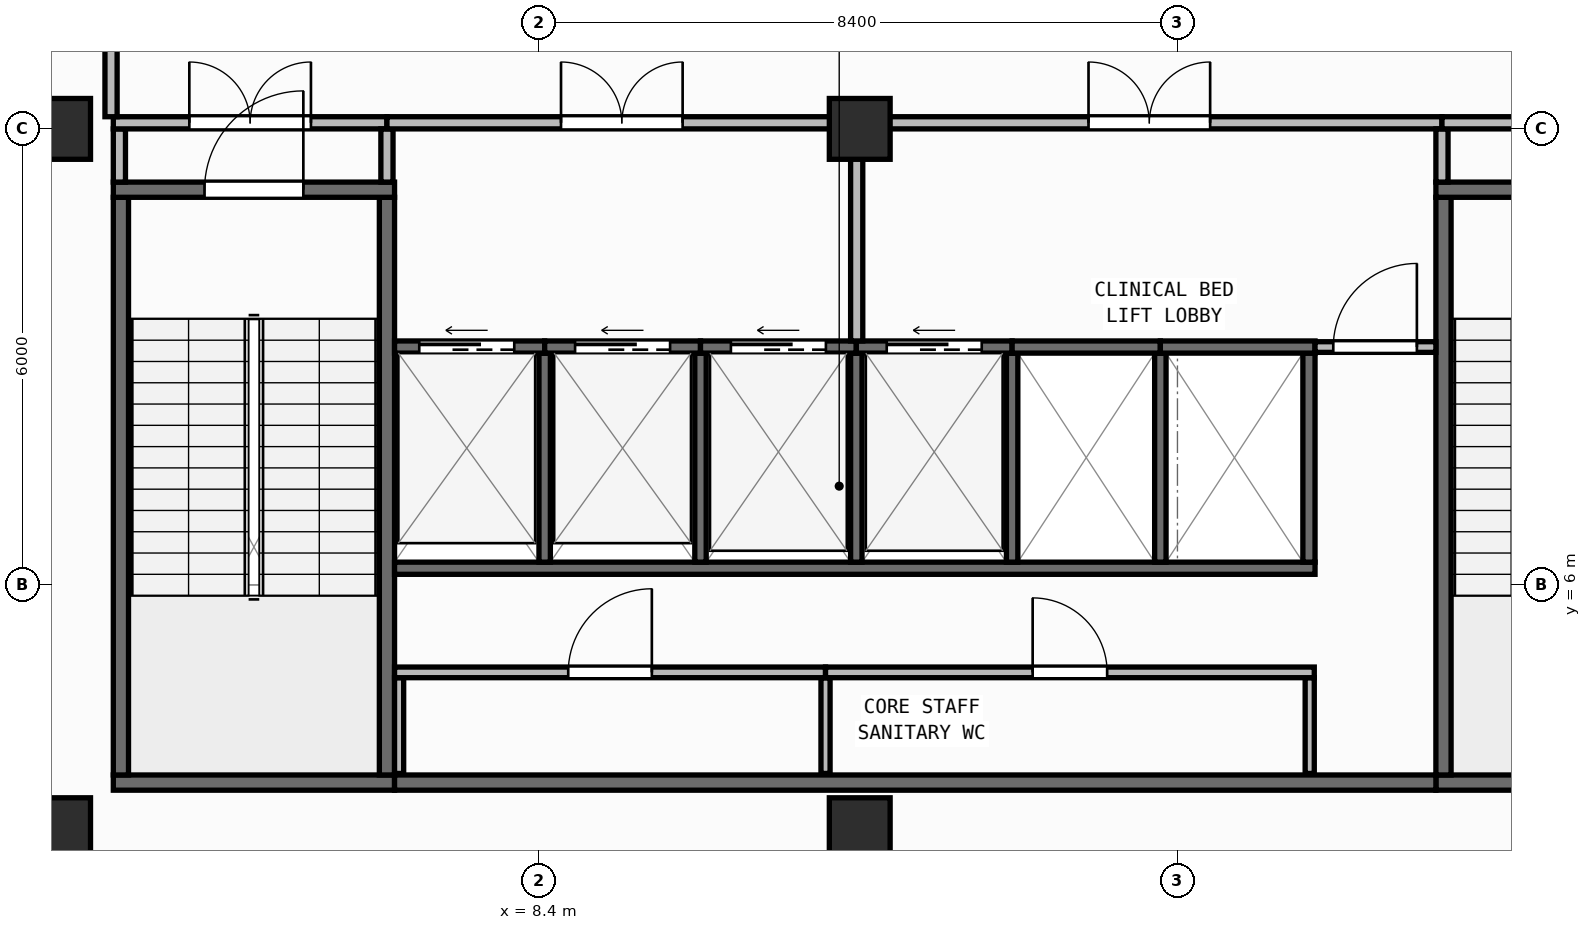
"""IFC4 building model, lengths in metres.
Left out: names, types, materials, properties, quantities, classifications, styles, units other than length and angle.
Written with IfcOpenShell. Run it as: python <this file> out.ifc"""

import sys

from ifc_helpers import new_model, si_unit, direction, frame, frame_2d, origin, origin_2d, place, context, subcontext, project, spatial, rectangle, extrude, element, fill, save


model = new_model("IFC4")
c1 = context("Model", 3, precision=1e-05, world=origin(), true_north=direction((0.0, 1.0)))
c2 = subcontext(c1, "Body", "Model", "MODEL_VIEW")
j1 = project(units=[si_unit("LENGTHUNIT", "METRE"), si_unit("PLANEANGLEUNIT", "RADIAN")], contexts=[c1])
p1 = place(None, origin())
s1 = spatial("IfcSite", under=j1, at=p1, CompositionType="ELEMENT")
p2 = place(p1, origin())
s2 = spatial("IfcBuilding", under=s1, at=p2, CompositionType="ELEMENT")
p3 = place(p2, frame((0.0, 0.0, 303.95)))
s3 = spatial("IfcBuildingStorey", under=s2, at=p3, CompositionType="ELEMENT", Elevation=303.95)
for number, where, z_axis, x_axis in (
    (1, (2.1, 2.8, 0.0), (0.0, 0.0, 1.0), (1.0, 0.0, 0.0)),
    (2, (12.62, 2.8, 0.0), (0.0, 0.0, 1.0), (1.0, 0.0, 0.0)),
    (3, (2.1, 12.0, 0.0), (0.0, 0.0, 1.0), (1.0, 0.0, 0.0)),
    (4, (12.62, 12.0, 0.0), (0.0, 0.0, 1.0), (1.0, 0.0, 0.0)),
):
    element("IfcColumn", number, at=place(p3, frame(where, z_axis=z_axis, x_axis=x_axis)), inside=s3, PredefinedType="COLUMN", context=c2, shape_type="SweptSolid", body=[
        extrude(rectangle(XDim=0.8, YDim=0.8, at=origin_2d()), origin(), (0.0, 0.0, 1.0), 5.25),
    ])
p4 = place(p3, frame((2.46, 0.171, 0.0), z_axis=(0.0, 0.0, 1.0), x_axis=(0.997760665813, 0.066885377746, 0.0)))
e5 = element("IfcWall", 5, at=p4, inside=s3, PredefinedType="STANDARD", context=c2, shape_type="SweptSolid", body=[
    extrude(rectangle(XDim=35.56, YDim=0.26, at=frame_2d((17.78, 0.0))), origin(), (0.0, 0.0, 1.0), 4.99),
])
p5 = place(p3, frame((2.8, 3.4, 0.0), z_axis=(0.0, 0.0, 1.0), x_axis=(1.0, 0.0, 0.0)))
e6 = element("IfcWall", 6, at=p5, inside=s3, PredefinedType="SHEAR", context=c2, shape_type="SweptSolid", body=[
    extrude(rectangle(XDim=3.7, YDim=0.2, at=frame_2d((1.85, 0.0))), origin(), (0.0, 0.0, 1.0), 4.99),
])
for number, where, z_axis, x_axis in (
    (7, (2.9, 3.5, 0.0), (0.0, 0.0, 1.0), (0.0, 1.0, 0.0)),
    (8, (6.4, 3.5, 0.0), (0.0, 0.0, 1.0), (0.0, 1.0, 0.0)),
):
    element("IfcWall", number, at=place(p3, frame(where, z_axis=z_axis, x_axis=x_axis)), inside=s3, PredefinedType="SHEAR", context=c2, shape_type="SweptSolid", body=[
        extrude(rectangle(XDim=7.6, YDim=0.2, at=frame_2d((3.8, 0.0))), origin(), (0.0, 0.0, 1.0), 4.99),
    ])
p6 = place(p3, frame((2.8, 11.2, 0.0), z_axis=(0.0, 0.0, 1.0), x_axis=(1.0, 0.0, 0.0)))
e9 = element("IfcWall", 9, at=p6, inside=s3, PredefinedType="SHEAR", context=c2, shape_type="SweptSolid", body=[
    extrude(rectangle(XDim=3.7, YDim=0.2, at=frame_2d((1.85, 0.0))), origin(), (0.0, 0.0, 1.0), 4.99),
])
p7 = place(p6, frame((1.2, 0.0, 0.0)))
e10 = element("IfcOpeningElement", 10, at=p7, cuts=e9, PredefinedType="OPENING", context=c2, shape_type="SweptSolid", body=[
    extrude(rectangle(XDim=1.3, YDim=2.15, at=frame_2d((0.65, 1.075))), frame((0.0, 0.11, 0.0), z_axis=(0.0, -1.0, 0.0), x_axis=(1.0, 0.0, 0.0)), (0.0, 0.0, 1.0), 0.22),
])
p8 = place(p3, frame((20.2, 3.4, 0.0), z_axis=(0.0, 0.0, 1.0), x_axis=(1.0, 0.0, 0.0)))
e11 = element("IfcWall", 11, at=p8, inside=s3, PredefinedType="SHEAR", context=c2, shape_type="SweptSolid", body=[
    extrude(rectangle(XDim=3.7, YDim=0.2, at=frame_2d((1.85, 0.0))), origin(), (0.0, 0.0, 1.0), 4.99),
])
p9 = place(p3, frame((20.3, 3.5, 0.0), z_axis=(0.0, 0.0, 1.0), x_axis=(0.0, 1.0, 0.0)))
e12 = element("IfcWall", 12, at=p9, inside=s3, PredefinedType="SHEAR", context=c2, shape_type="SweptSolid", body=[
    extrude(rectangle(XDim=7.6, YDim=0.2, at=frame_2d((3.8, 0.0))), origin(), (0.0, 0.0, 1.0), 4.99),
])
p10 = place(p3, frame((20.2, 11.2, 0.0), z_axis=(0.0, 0.0, 1.0), x_axis=(1.0, 0.0, 0.0)))
e13 = element("IfcWall", 13, at=p10, inside=s3, PredefinedType="SHEAR", context=c2, shape_type="SweptSolid", body=[
    extrude(rectangle(XDim=3.7, YDim=0.2, at=frame_2d((1.85, 0.0))), origin(), (0.0, 0.0, 1.0), 4.99),
])
p11 = place(p10, frame((1.2, 0.0, 0.0)))
e14 = element("IfcOpeningElement", 14, at=p11, cuts=e13, PredefinedType="OPENING", context=c2, shape_type="SweptSolid", body=[
    extrude(rectangle(XDim=1.3, YDim=2.15, at=frame_2d((0.65, 1.075))), frame((0.0, 0.11, 0.0), z_axis=(0.0, -1.0, 0.0), x_axis=(1.0, 0.0, 0.0)), (0.0, 0.0, 1.0), 0.22),
])
p12 = place(p3, frame((6.5, 3.4, 0.0), z_axis=(0.0, 0.0, 1.0), x_axis=(1.0, 0.0, 0.0)))
e15 = element("IfcWall", 15, at=p12, inside=s3, PredefinedType="SHEAR", context=c2, shape_type="SweptSolid", body=[
    extrude(rectangle(XDim=13.7, YDim=0.2, at=frame_2d((6.85, 0.0))), origin(), (0.0, 0.0, 1.0), 4.99),
])
p13 = place(p3, frame((6.5, 6.22, 0.0), z_axis=(0.0, 0.0, 1.0), x_axis=(1.0, 0.0, 0.0)))
e16 = element("IfcWall", 16, at=p13, inside=s3, PredefinedType="SHEAR", context=c2, shape_type="SweptSolid", body=[
    extrude(rectangle(XDim=12.11, YDim=0.16, at=frame_2d((6.055, 0.0))), origin(), (0.0, 0.0, 1.0), 4.99),
])
p14 = place(p3, frame((18.53, 6.3, 0.0), z_axis=(0.0, 0.0, 1.0), x_axis=(0.0, 1.0, 0.0)))
e17 = element("IfcWall", 17, at=p14, inside=s3, PredefinedType="SHEAR", context=c2, shape_type="SweptSolid", body=[
    extrude(rectangle(XDim=2.75, YDim=0.16, at=frame_2d((1.375, 0.0))), origin(), (0.0, 0.0, 1.0), 4.99),
])
for number, where, z_axis, x_axis in (
    (18, (8.475, 6.3, 0.0), (0.0, 0.0, 1.0), (0.0, 1.0, 0.0)),
    (19, (10.525, 6.3, 0.0), (0.0, 0.0, 1.0), (0.0, 1.0, 0.0)),
    (20, (12.575, 6.3, 0.0), (0.0, 0.0, 1.0), (0.0, 1.0, 0.0)),
    (21, (14.625, 6.3, 0.0), (0.0, 0.0, 1.0), (0.0, 1.0, 0.0)),
    (22, (16.575, 6.3, 0.0), (0.0, 0.0, 1.0), (0.0, 1.0, 0.0)),
):
    element("IfcWall", number, at=place(p3, frame(where, z_axis=z_axis, x_axis=x_axis)), inside=s3, PredefinedType="SHEAR", context=c2, shape_type="SweptSolid", body=[
        extrude(rectangle(XDim=2.75, YDim=0.15, at=frame_2d((1.375, 0.0))), origin(), (0.0, 0.0, 1.0), 4.99),
    ])
p15 = place(p3, frame((6.5, 9.13, 0.0), z_axis=(0.0, 0.0, 1.0), x_axis=(1.0, 0.0, 0.0)))
e23 = element("IfcWall", 23, at=p15, inside=s3, PredefinedType="SHEAR", context=c2, shape_type="SweptSolid", body=[
    extrude(rectangle(XDim=1.975, YDim=0.16, at=frame_2d((0.988, 0.0))), origin(), (0.0, 0.0, 1.0), 4.99),
])
p16 = place(p15, frame((0.325, 0.0, 0.0)))
e24 = element("IfcOpeningElement", 24, at=p16, cuts=e23, PredefinedType="OPENING", context=c2, shape_type="SweptSolid", body=[
    extrude(rectangle(XDim=1.25, YDim=2.15, at=frame_2d((0.625, 1.075))), frame((0.0, 0.09, 0.0), z_axis=(0.0, -1.0, 0.0), x_axis=(1.0, 0.0, 0.0)), (0.0, 0.0, 1.0), 0.18),
])
p17 = place(p3, frame((8.475, 9.13, 0.0), z_axis=(0.0, 0.0, 1.0), x_axis=(1.0, 0.0, 0.0)))
e25 = element("IfcWall", 25, at=p17, inside=s3, PredefinedType="SHEAR", context=c2, shape_type="SweptSolid", body=[
    extrude(rectangle(XDim=2.05, YDim=0.16, at=frame_2d((1.025, 0.0))), origin(), (0.0, 0.0, 1.0), 4.99),
])
p18 = place(p17, frame((0.4, 0.0, 0.0)))
e26 = element("IfcOpeningElement", 26, at=p18, cuts=e25, PredefinedType="OPENING", context=c2, shape_type="SweptSolid", body=[
    extrude(rectangle(XDim=1.25, YDim=2.15, at=frame_2d((0.625, 1.075))), frame((0.0, 0.09, 0.0), z_axis=(0.0, -1.0, 0.0), x_axis=(1.0, 0.0, 0.0)), (0.0, 0.0, 1.0), 0.18),
])
p19 = place(p3, frame((10.525, 9.13, 0.0), z_axis=(0.0, 0.0, 1.0), x_axis=(1.0, 0.0, 0.0)))
e27 = element("IfcWall", 27, at=p19, inside=s3, PredefinedType="SHEAR", context=c2, shape_type="SweptSolid", body=[
    extrude(rectangle(XDim=2.05, YDim=0.16, at=frame_2d((1.025, 0.0))), origin(), (0.0, 0.0, 1.0), 4.99),
])
p20 = place(p19, frame((0.4, 0.0, 0.0)))
e28 = element("IfcOpeningElement", 28, at=p20, cuts=e27, PredefinedType="OPENING", context=c2, shape_type="SweptSolid", body=[
    extrude(rectangle(XDim=1.25, YDim=2.15, at=frame_2d((0.625, 1.075))), frame((0.0, 0.09, 0.0), z_axis=(0.0, -1.0, 0.0), x_axis=(1.0, 0.0, 0.0)), (0.0, 0.0, 1.0), 0.18),
])
p21 = place(p3, frame((12.575, 9.13, 0.0), z_axis=(0.0, 0.0, 1.0), x_axis=(1.0, 0.0, 0.0)))
e29 = element("IfcWall", 29, at=p21, inside=s3, PredefinedType="SHEAR", context=c2, shape_type="SweptSolid", body=[
    extrude(rectangle(XDim=2.05, YDim=0.16, at=frame_2d((1.025, 0.0))), origin(), (0.0, 0.0, 1.0), 4.99),
])
p22 = place(p21, frame((0.4, 0.0, 0.0)))
e30 = element("IfcOpeningElement", 30, at=p22, cuts=e29, PredefinedType="OPENING", context=c2, shape_type="SweptSolid", body=[
    extrude(rectangle(XDim=1.25, YDim=2.15, at=frame_2d((0.625, 1.075))), frame((0.0, 0.09, 0.0), z_axis=(0.0, -1.0, 0.0), x_axis=(1.0, 0.0, 0.0)), (0.0, 0.0, 1.0), 0.18),
])
p23 = place(p3, frame((14.625, 9.13, 0.0), z_axis=(0.0, 0.0, 1.0), x_axis=(1.0, 0.0, 0.0)))
e31 = element("IfcWall", 31, at=p23, inside=s3, PredefinedType="SHEAR", context=c2, shape_type="SweptSolid", body=[
    extrude(rectangle(XDim=1.95, YDim=0.16, at=frame_2d((0.975, 0.0))), origin(), (0.0, 0.0, 1.0), 4.99),
])
p24 = place(p3, frame((16.575, 9.13, 0.0), z_axis=(0.0, 0.0, 1.0), x_axis=(1.0, 0.0, 0.0)))
e32 = element("IfcWall", 32, at=p24, inside=s3, PredefinedType="SHEAR", context=c2, shape_type="SweptSolid", body=[
    extrude(rectangle(XDim=2.035, YDim=0.16, at=frame_2d((1.018, 0.0))), origin(), (0.0, 0.0, 1.0), 4.99),
])
p25 = place(p3, frame((6.56, 3.52, 0.0), z_axis=(0.0, 0.0, 1.0), x_axis=(0.0, 1.0, 0.0)))
e33 = element("IfcWall", 33, at=p25, inside=s3, PredefinedType="PARTITIONING", context=c2, shape_type="SweptSolid", body=[
    extrude(rectangle(XDim=1.26, YDim=0.12, at=frame_2d((0.63, 0.0))), origin(), (0.0, 0.0, 1.0), 4.99),
])
p26 = place(p3, frame((12.17, 3.52, 0.0), z_axis=(0.0, 0.0, 1.0), x_axis=(0.0, 1.0, 0.0)))
e34 = element("IfcWall", 34, at=p26, inside=s3, PredefinedType="PARTITIONING", context=c2, shape_type="SweptSolid", body=[
    extrude(rectangle(XDim=1.26, YDim=0.12, at=frame_2d((0.63, 0.0))), origin(), (0.0, 0.0, 1.0), 4.437),
])
p27 = place(p3, frame((18.54, 3.52, 0.0), z_axis=(0.0, 0.0, 1.0), x_axis=(0.0, 1.0, 0.0)))
e35 = element("IfcWall", 35, at=p27, inside=s3, PredefinedType="PARTITIONING", context=c2, shape_type="SweptSolid", body=[
    extrude(rectangle(XDim=1.26, YDim=0.12, at=frame_2d((0.63, 0.0))), origin(), (0.0, 0.0, 1.0), 4.99),
])
p28 = place(p3, frame((6.5, 4.85, 0.0), z_axis=(0.0, 0.0, 1.0), x_axis=(1.0, 0.0, 0.0)))
e36 = element("IfcWall", 36, at=p28, inside=s3, PredefinedType="PARTITIONING", context=c2, shape_type="SweptSolid", body=[
    extrude(rectangle(XDim=5.67, YDim=0.14, at=frame_2d((2.835, 0.0))), origin(), (0.0, 0.0, 1.0), 4.99),
])
p29 = place(p28, frame((2.285, 0.0, 0.0)))
e37 = element("IfcOpeningElement", 37, at=p29, cuts=e36, PredefinedType="OPENING", context=c2, shape_type="SweptSolid", body=[
    extrude(rectangle(XDim=1.1, YDim=2.1, at=frame_2d((0.55, 1.05))), frame((0.0, 0.08, 0.0), z_axis=(0.0, -1.0, 0.0), x_axis=(1.0, 0.0, 0.0)), (0.0, 0.0, 1.0), 0.16),
])
p30 = place(p3, frame((12.17, 4.85, 0.0), z_axis=(0.0, 0.0, 1.0), x_axis=(1.0, 0.0, 0.0)))
e38 = element("IfcWall", 38, at=p30, inside=s3, PredefinedType="PARTITIONING", context=c2, shape_type="SweptSolid", body=[
    extrude(rectangle(XDim=6.43, YDim=0.14, at=frame_2d((3.215, 0.0))), origin(), (0.0, 0.0, 1.0), 4.99),
])
p31 = place(p30, frame((2.725, 0.0, 0.0)))
e39 = element("IfcOpeningElement", 39, at=p31, cuts=e38, PredefinedType="OPENING", context=c2, shape_type="SweptSolid", body=[
    extrude(rectangle(XDim=0.98, YDim=2.1, at=frame_2d((0.49, 1.05))), frame((0.0, 0.08, 0.0), z_axis=(0.0, -1.0, 0.0), x_axis=(1.0, 0.0, 0.0)), (0.0, 0.0, 1.0), 0.16),
])
p32 = place(p3, frame((18.61, 9.13, 0.0), z_axis=(0.0, 0.0, 1.0), x_axis=(1.0, 0.0, 0.0)))
e40 = element("IfcWall", 40, at=p32, inside=s3, PredefinedType="PARTITIONING", context=c2, shape_type="SweptSolid", body=[
    extrude(rectangle(XDim=1.59, YDim=0.14, at=frame_2d((0.795, 0.0))), origin(), (0.0, 0.0, 1.0), 4.99),
])
p33 = place(p32, frame((0.24, 0.0, 0.0)))
e41 = element("IfcOpeningElement", 41, at=p33, cuts=e40, PredefinedType="OPENING", context=c2, shape_type="SweptSolid", body=[
    extrude(rectangle(XDim=1.1, YDim=2.1, at=frame_2d((0.55, 1.05))), frame((0.0, 0.08, 0.0), z_axis=(0.0, -1.0, 0.0), x_axis=(1.0, 0.0, 0.0)), (0.0, 0.0, 1.0), 0.16),
])
p34 = place(p3, frame((2.88, 11.3, 0.0), z_axis=(0.0, 0.0, 1.0), x_axis=(0.0, 1.0, 0.0)))
e42 = element("IfcWall", 42, at=p34, inside=s3, PredefinedType="PARTITIONING", context=c2, shape_type="SweptSolid", body=[
    extrude(rectangle(XDim=0.7, YDim=0.16, at=frame_2d((0.35, 0.0))), origin(), (0.0, 0.0, 1.0), 4.99),
])
p35 = place(p3, frame((2.8, 12.08, 0.0), z_axis=(0.0, 0.0, 1.0), x_axis=(1.0, 0.0, 0.0)))
e43 = element("IfcWall", 43, at=p35, inside=s3, PredefinedType="PARTITIONING", context=c2, shape_type="SweptSolid", body=[
    extrude(rectangle(XDim=3.6, YDim=0.16, at=frame_2d((1.8, 0.0))), origin(), (0.0, 0.0, 1.0), 4.265),
])
p36 = place(p35, frame((1.0, 0.0, 0.0)))
e44 = element("IfcOpeningElement", 44, at=p36, cuts=e43, PredefinedType="OPENING", context=c2, shape_type="SweptSolid", body=[
    extrude(rectangle(XDim=1.6, YDim=2.05, at=frame_2d((0.8, 1.025))), frame((0.0, 0.09, 0.0), z_axis=(0.0, -1.0, 0.0), x_axis=(1.0, 0.0, 0.0)), (0.0, 0.0, 1.0), 0.18),
])
p37 = place(p3, frame((6.4, 11.3, 0.0), z_axis=(0.0, 0.0, 1.0), x_axis=(0.0, 1.0, 0.0)))
e45 = element("IfcWall", 45, at=p37, inside=s3, PredefinedType="PARTITIONING", context=c2, shape_type="SweptSolid", body=[
    extrude(rectangle(XDim=0.7, YDim=0.16, at=frame_2d((0.35, 0.0))), origin(), (0.0, 0.0, 1.0), 4.99),
])
p38 = place(p3, frame((6.4, 12.08, 0.0), z_axis=(0.0, 0.0, 1.0), x_axis=(1.0, 0.0, 0.0)))
e46 = element("IfcWall", 46, at=p38, inside=s3, PredefinedType="PARTITIONING", context=c2, shape_type="SweptSolid", body=[
    extrude(rectangle(XDim=6.18, YDim=0.16, at=frame_2d((3.09, 0.0))), origin(), (0.0, 0.0, 1.0), 4.265),
])
p39 = place(p38, frame((2.29, 0.0, 0.0)))
e47 = element("IfcOpeningElement", 47, at=p39, cuts=e46, PredefinedType="OPENING", context=c2, shape_type="SweptSolid", body=[
    extrude(rectangle(XDim=1.6, YDim=2.05, at=frame_2d((0.8, 1.025))), frame((0.0, 0.09, 0.0), z_axis=(0.0, -1.0, 0.0), x_axis=(1.0, 0.0, 0.0)), (0.0, 0.0, 1.0), 0.18),
])
p40 = place(p3, frame((12.58, 9.21, 0.0), z_axis=(0.0, 0.0, 1.0), x_axis=(0.0, 1.0, 0.0)))
e48 = element("IfcWall", 48, at=p40, inside=s3, PredefinedType="PARTITIONING", context=c2, shape_type="SweptSolid", body=[
    extrude(rectangle(XDim=2.79, YDim=0.16, at=frame_2d((1.395, 0.0))), origin(), (0.0, 0.0, 1.0), 4.437),
])
p41 = place(p3, frame((12.58, 12.08, 0.0), z_axis=(0.0, 0.0, 1.0), x_axis=(1.0, 0.0, 0.0)))
e49 = element("IfcWall", 49, at=p41, inside=s3, PredefinedType="PARTITIONING", context=c2, shape_type="SweptSolid", body=[
    extrude(rectangle(XDim=7.7, YDim=0.16, at=frame_2d((3.85, 0.0))), origin(), (0.0, 0.0, 1.0), 4.265),
])
p42 = place(p41, frame((3.05, 0.0, 0.0)))
e50 = element("IfcOpeningElement", 50, at=p42, cuts=e49, PredefinedType="OPENING", context=c2, shape_type="SweptSolid", body=[
    extrude(rectangle(XDim=1.6, YDim=2.05, at=frame_2d((0.8, 1.025))), frame((0.0, 0.09, 0.0), z_axis=(0.0, -1.0, 0.0), x_axis=(1.0, 0.0, 0.0)), (0.0, 0.0, 1.0), 0.18),
])
p43 = place(p3, frame((20.28, 11.3, 0.0), z_axis=(0.0, 0.0, 1.0), x_axis=(0.0, 1.0, 0.0)))
e51 = element("IfcWall", 51, at=p43, inside=s3, PredefinedType="PARTITIONING", context=c2, shape_type="SweptSolid", body=[
    extrude(rectangle(XDim=0.7, YDim=0.16, at=frame_2d((0.35, 0.0))), origin(), (0.0, 0.0, 1.0), 4.99),
])
p44 = place(p3, frame((20.28, 12.08, 0.0), z_axis=(0.0, 0.0, 1.0), x_axis=(1.0, 0.0, 0.0)))
e52 = element("IfcWall", 52, at=p44, inside=s3, PredefinedType="PARTITIONING", context=c2, shape_type="SweptSolid", body=[
    extrude(rectangle(XDim=3.62, YDim=0.16, at=frame_2d((1.81, 0.0))), origin(), (0.0, 0.0, 1.0), 4.265),
])
p45 = place(p44, frame((1.01, 0.0, 0.0)))
e53 = element("IfcOpeningElement", 53, at=p45, cuts=e52, PredefinedType="OPENING", context=c2, shape_type="SweptSolid", body=[
    extrude(rectangle(XDim=1.6, YDim=2.05, at=frame_2d((0.8, 1.025))), frame((0.0, 0.09, 0.0), z_axis=(0.0, -1.0, 0.0), x_axis=(1.0, 0.0, 0.0)), (0.0, 0.0, 1.0), 0.18),
])
p46 = place(p3, frame((2.77, 12.16, 0.0), z_axis=(0.0, 0.0, 1.0), x_axis=(0.0, 1.0, 0.0)))
e54 = element("IfcWall", 54, at=p46, inside=s3, PredefinedType="PARTITIONING", context=c2, shape_type="SweptSolid", body=[
    extrude(rectangle(XDim=16.04, YDim=0.16, at=frame_2d((8.02, 0.0))), origin(), (0.0, 0.0, 1.0), 4.99),
])
p47 = place(p7, origin())
e55 = element("IfcDoor", 55, at=p47, inside=s3, OperationType="SINGLE_SWING_RIGHT", PredefinedType="DOOR", context=c2, shape_type="SweptSolid", body=[
    extrude(rectangle(XDim=1.3, YDim=2.15, at=frame_2d((0.65, 1.075))), frame((0.0, 0.025, 0.0), z_axis=(0.0, -1.0, 0.0), x_axis=(1.0, 0.0, 0.0)), (0.0, 0.0, 1.0), 0.05),
])
fill(e10, e55)
p48 = place(p16, origin())
e56 = element("IfcDoor", 56, at=p48, inside=s3, OperationType="SLIDING_TO_LEFT", PredefinedType="DOOR", context=c2, shape_type="SweptSolid", body=[
    extrude(rectangle(XDim=1.25, YDim=2.15, at=frame_2d((0.625, 1.075))), frame((0.0, 0.025, 0.0), z_axis=(0.0, -1.0, 0.0), x_axis=(1.0, 0.0, 0.0)), (0.0, 0.0, 1.0), 0.05),
])
fill(e24, e56)
p49 = place(p18, origin())
e57 = element("IfcDoor", 57, at=p49, inside=s3, OperationType="SLIDING_TO_LEFT", PredefinedType="DOOR", context=c2, shape_type="SweptSolid", body=[
    extrude(rectangle(XDim=1.25, YDim=2.15, at=frame_2d((0.625, 1.075))), frame((0.0, 0.025, 0.0), z_axis=(0.0, -1.0, 0.0), x_axis=(1.0, 0.0, 0.0)), (0.0, 0.0, 1.0), 0.05),
])
fill(e26, e57)
p50 = place(p20, origin())
e58 = element("IfcDoor", 58, at=p50, inside=s3, OperationType="SLIDING_TO_LEFT", PredefinedType="DOOR", context=c2, shape_type="SweptSolid", body=[
    extrude(rectangle(XDim=1.25, YDim=2.15, at=frame_2d((0.625, 1.075))), frame((0.0, 0.025, 0.0), z_axis=(0.0, -1.0, 0.0), x_axis=(1.0, 0.0, 0.0)), (0.0, 0.0, 1.0), 0.05),
])
fill(e28, e58)
p51 = place(p22, origin())
e59 = element("IfcDoor", 59, at=p51, inside=s3, OperationType="SLIDING_TO_LEFT", PredefinedType="DOOR", context=c2, shape_type="SweptSolid", body=[
    extrude(rectangle(XDim=1.25, YDim=2.15, at=frame_2d((0.625, 1.075))), frame((0.0, 0.025, 0.0), z_axis=(0.0, -1.0, 0.0), x_axis=(1.0, 0.0, 0.0)), (0.0, 0.0, 1.0), 0.05),
])
fill(e30, e59)
p52 = place(p29, origin())
e60 = element("IfcDoor", 60, at=p52, inside=s3, OperationType="SINGLE_SWING_RIGHT", PredefinedType="DOOR", context=c2, shape_type="SweptSolid", body=[
    extrude(rectangle(XDim=1.1, YDim=2.1, at=frame_2d((0.55, 1.05))), frame((0.0, 0.025, 0.0), z_axis=(0.0, -1.0, 0.0), x_axis=(1.0, 0.0, 0.0)), (0.0, 0.0, 1.0), 0.05),
])
fill(e37, e60)
p53 = place(p31, origin())
e61 = element("IfcDoor", 61, at=p53, inside=s3, OperationType="SINGLE_SWING_LEFT", PredefinedType="DOOR", context=c2, shape_type="SweptSolid", body=[
    extrude(rectangle(XDim=0.98, YDim=2.1, at=frame_2d((0.49, 1.05))), frame((0.0, 0.025, 0.0), z_axis=(0.0, -1.0, 0.0), x_axis=(1.0, 0.0, 0.0)), (0.0, 0.0, 1.0), 0.05),
])
fill(e39, e61)
p54 = place(p33, origin())
e62 = element("IfcDoor", 62, at=p54, inside=s3, OperationType="SINGLE_SWING_RIGHT", PredefinedType="DOOR", context=c2, shape_type="SweptSolid", body=[
    extrude(rectangle(XDim=1.1, YDim=2.1, at=frame_2d((0.55, 1.05))), frame((0.0, 0.025, 0.0), z_axis=(0.0, -1.0, 0.0), x_axis=(1.0, 0.0, 0.0)), (0.0, 0.0, 1.0), 0.05),
])
fill(e41, e62)
p55 = place(p36, origin())
e63 = element("IfcDoor", 63, at=p55, inside=s3, OperationType="DOUBLE_DOOR_SINGLE_SWING", PredefinedType="DOOR", context=c2, shape_type="SweptSolid", body=[
    extrude(rectangle(XDim=1.6, YDim=2.05, at=frame_2d((0.8, 1.025))), frame((0.0, 0.025, 0.0), z_axis=(0.0, -1.0, 0.0), x_axis=(1.0, 0.0, 0.0)), (0.0, 0.0, 1.0), 0.05),
])
fill(e44, e63)
p56 = place(p39, origin())
e64 = element("IfcDoor", 64, at=p56, inside=s3, OperationType="DOUBLE_DOOR_SINGLE_SWING", PredefinedType="DOOR", context=c2, shape_type="SweptSolid", body=[
    extrude(rectangle(XDim=1.6, YDim=2.05, at=frame_2d((0.8, 1.025))), frame((0.0, 0.025, 0.0), z_axis=(0.0, -1.0, 0.0), x_axis=(1.0, 0.0, 0.0)), (0.0, 0.0, 1.0), 0.05),
])
fill(e47, e64)
p57 = place(p42, origin())
e65 = element("IfcDoor", 65, at=p57, inside=s3, OperationType="DOUBLE_DOOR_SINGLE_SWING", PredefinedType="DOOR", context=c2, shape_type="SweptSolid", body=[
    extrude(rectangle(XDim=1.6, YDim=2.05, at=frame_2d((0.8, 1.025))), frame((0.0, 0.025, 0.0), z_axis=(0.0, -1.0, 0.0), x_axis=(1.0, 0.0, 0.0)), (0.0, 0.0, 1.0), 0.05),
])
fill(e50, e65)
save(model, sys.argv[1])
